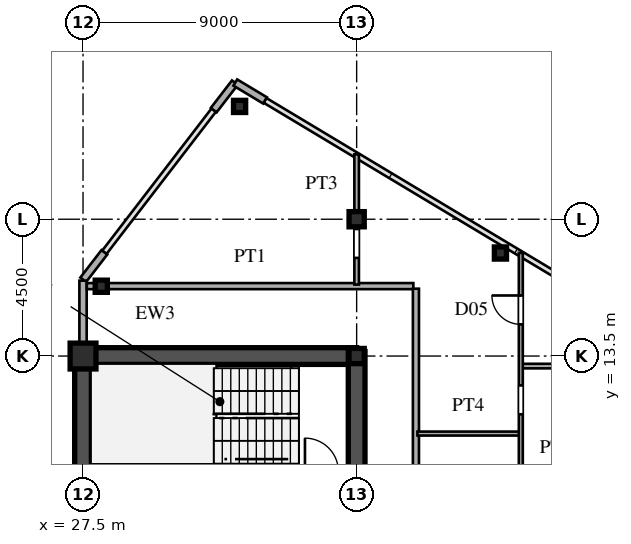
"""IFC4 building model, lengths in metres.
Left out: names, types, materials, properties, quantities, classifications, styles, units other than length and angle.
Written with IfcOpenShell. Run it as: python <this file> out.ifc"""

import sys

from ifc_helpers import new_model, si_unit, direction, frame, frame_2d, origin, origin_2d, place, context, subcontext, project, spatial, rectangle, hollow_rectangle, i_section, extrude, source, transform, mapped, element, fill, save


model = new_model("IFC4")
c1 = context("Model", 3, precision=1e-05, world=origin(), true_north=direction((0.0, 1.0)))
c2 = subcontext(c1, "Body", "Model", "MODEL_VIEW")
j1 = project(units=[si_unit("LENGTHUNIT", "METRE"), si_unit("PLANEANGLEUNIT", "RADIAN")], contexts=[c1])
p1 = place(None, origin())
s1 = spatial("IfcSite", under=j1, at=p1, CompositionType="ELEMENT")
p2 = place(p1, origin())
s2 = spatial("IfcBuilding", under=s1, at=p2, CompositionType="ELEMENT")
p3 = place(p2, frame((0.0, 0.0, 199.5)))
s3 = spatial("IfcBuildingStorey", under=s2, at=p3, CompositionType="ELEMENT", Elevation=199.5)
m1 = source(origin(), c2, "Body", "SweptSolid", [
    extrude(hollow_rectangle(XDim=0.85, YDim=0.85, WallThickness=0.036, at=origin_2d()), origin(), (0.0, 0.0, 1.0), 3.6),
])
p4 = place(p3, frame((27.5, 13.5, 0.0), z_axis=(0.0, 0.0, 1.0), x_axis=(1.0, 0.0, 0.0)))
e1 = element("IfcColumn", 1, at=p4, inside=s3, PredefinedType="COLUMN", context=c2, shape_type="MappedRepresentation", body=[
    mapped(m1, transform((0.0, 0.0, 0.0), scale=1.0)),
])
m2 = source(origin(), c2, "Body", "SweptSolid", [
    extrude(i_section(OverallWidth=0.5, OverallDepth=0.5, WebThickness=0.02, FlangeThickness=0.032, at=origin_2d()), origin(), (0.0, 0.0, 1.0), 3.6),
])
for number, where, z_axis, x_axis in (
    (2, (36.5, 13.5, 0.0), (0.0, 0.0, 1.0), (1.0, 0.0, 0.0)),
    (3, (36.5, 18.0, 0.0), (0.0, 0.0, 1.0), (1.0, 0.0, 0.0)),
):
    element("IfcColumn", number, at=place(p3, frame(where, z_axis=z_axis, x_axis=x_axis)), inside=s3, PredefinedType="COLUMN", context=c2, shape_type="MappedRepresentation", body=[
        mapped(m2, transform((0.0, 0.0, 0.0), scale=1.0)),
    ])
m3 = source(origin(), c2, "Body", "SweptSolid", [
    extrude(hollow_rectangle(XDim=0.4, YDim=0.4, WallThickness=0.016, at=origin_2d()), origin(), (0.0, 0.0, 1.0), 3.6),
])
for number, where, z_axis, x_axis in (
    (4, (32.65, 21.71, 0.0), (0.0, 0.0, 1.0), (1.0, 0.0, 0.0)),
    (5, (28.1, 15.796, 0.0), (0.0, 0.0, 1.0), (1.0, 0.0, 0.0)),
    (6, (41.23, 16.889, 0.0), (0.0, 0.0, 1.0), (1.0, 0.0, 0.0)),
):
    element("IfcColumn", number, at=place(p3, frame(where, z_axis=z_axis, x_axis=x_axis)), inside=s3, PredefinedType="COLUMN", context=c2, shape_type="MappedRepresentation", body=[
        mapped(m3, transform((0.0, 0.0, 0.0), scale=1.0)),
    ])
for number, where, z_axis, x_axis in (
    (7, (33.486, 21.908, 0.0), (0.0, 0.0, 1.0), (-0.857, 0.515, 0.0)),
    (8, (32.494, 22.492, 0.0), (0.0, 0.0, 1.0), (-0.61, -0.793, 0.0)),
    (9, (28.201, 16.912, 0.0), (0.0, 0.0, 1.0), (-0.61, -0.793, 0.0)),
):
    element("IfcWall", number, at=place(p3, frame(where, z_axis=z_axis, x_axis=x_axis)), inside=s3, PredefinedType="SOLIDWALL", context=c2, shape_type="SweptSolid", body=[
        extrude(rectangle(XDim=1.14, YDim=0.24, at=frame_2d((0.57, 0.0))), origin(), (0.0, 0.0, 1.0), 3.38),
    ])
p5 = place(p3, frame((27.5, 13.78, 0.0), z_axis=(0.0, 0.0, 1.0), x_axis=(0.0, 1.0, 0.0)))
e10 = element("IfcWall", 10, at=p5, inside=s3, PredefinedType="SOLIDWALL", context=c2, shape_type="SweptSolid", body=[
    extrude(rectangle(XDim=0.6, YDim=0.24, at=frame_2d((0.3, 0.0))), origin(), (0.0, 0.0, 1.0), 2.88),
])
p6 = place(p3, frame((27.5, 14.38, 0.0), z_axis=(0.0, 0.0, 1.0), x_axis=(0.0, 1.0, 0.0)))
e11 = element("IfcWall", 11, at=p6, inside=s3, PredefinedType="SOLIDWALL", context=c2, shape_type="SweptSolid", body=[
    extrude(rectangle(XDim=1.6, YDim=0.24, at=frame_2d((0.8, 0.0))), origin(), (0.0, 0.0, 1.0), 3.38),
])
p7 = place(p3, frame((27.5, 1.3, 0.0), z_axis=(0.0, 0.0, 1.0), x_axis=(0.0, 1.0, 0.0)))
e12 = element("IfcWall", 12, at=p7, inside=s3, PredefinedType="SHEAR", context=c2, shape_type="SweptSolid", body=[
    extrude(rectangle(XDim=12.2, YDim=0.55, at=frame_2d((6.1, 0.0))), origin(), (0.0, 0.0, 1.0), 3.38),
])
p8 = place(p3, frame((27.5, 13.5, 0.0), z_axis=(0.0, 0.0, 1.0), x_axis=(1.0, 0.0, 0.0)))
e13 = element("IfcWall", 13, at=p8, inside=s3, PredefinedType="SHEAR", context=c2, shape_type="SweptSolid", body=[
    extrude(rectangle(XDim=9.0, YDim=0.55, at=frame_2d((4.5, 0.0))), origin(), (0.0, 0.0, 1.0), 3.38),
])
p9 = place(p3, frame((36.5, 8.2, 0.0), z_axis=(0.0, 0.0, 1.0), x_axis=(0.0, 1.0, 0.0)))
e14 = element("IfcWall", 14, at=p9, inside=s3, PredefinedType="SHEAR", context=c2, shape_type="SweptSolid", body=[
    extrude(rectangle(XDim=5.45, YDim=0.55, at=frame_2d((2.725, 0.0))), origin(), (0.0, 0.0, 1.0), 3.38),
])
p10 = place(p9, frame((0.245, 0.0, 0.0)))
e15 = element("IfcOpeningElement", 15, at=p10, cuts=e14, PredefinedType="OPENING", context=c2, shape_type="SweptSolid", body=[
    extrude(rectangle(XDim=0.95, YDim=2.15, at=frame_2d((0.475, 1.075))), frame((0.0, 0.285, 0.0), z_axis=(0.0, -1.0, 0.0), x_axis=(1.0, 0.0, 0.0)), (0.0, 0.0, 1.0), 0.57),
])
p11 = place(p3, frame((38.5, 10.95, 0.0), z_axis=(0.0, 0.0, 1.0), x_axis=(1.0, 0.0, 0.0)))
e16 = element("IfcWall", 16, at=p11, inside=s3, PredefinedType="PARTITIONING", context=c2, shape_type="SweptSolid", body=[
    extrude(rectangle(XDim=3.35, YDim=0.13, at=frame_2d((1.675, 0.0))), origin(), (0.0, 0.0, 1.0), 3.38),
])
p12 = place(p3, frame((41.95, 13.17, 0.0), z_axis=(0.0, 0.0, 1.0), x_axis=(1.0, 0.0, 0.0)))
e17 = element("IfcWall", 17, at=p12, inside=s3, PredefinedType="PARTITIONING", context=c2, shape_type="SweptSolid", body=[
    extrude(rectangle(XDim=6.13, YDim=0.15, at=frame_2d((3.065, 0.0))), origin(), (0.0, 0.0, 1.0), 3.38),
])
p13 = place(p3, frame((27.625, 15.8, 0.0), z_axis=(0.0, 0.0, 1.0), x_axis=(1.0, 0.0, 0.0)))
e18 = element("IfcWall", 18, at=p13, inside=s3, PredefinedType="PARTITIONING", context=c2, shape_type="SweptSolid", body=[
    extrude(rectangle(XDim=10.74, YDim=0.2, at=frame_2d((5.37, 0.0))), origin(), (0.0, 0.0, 1.0), 3.38),
])
p14 = place(p3, frame((36.5, 15.85, 0.0), z_axis=(0.0, 0.0, 1.0), x_axis=(0.0, 1.0, 0.0)))
e19 = element("IfcWall", 19, at=p14, inside=s3, PredefinedType="PARTITIONING", context=c2, shape_type="SweptSolid", body=[
    extrude(rectangle(XDim=4.285, YDim=0.15, at=frame_2d((2.143, 0.0))), origin(), (0.0, 0.0, 1.0), 2.78),
])
p15 = place(p14, frame((0.878, 0.0, 0.0)))
e20 = element("IfcOpeningElement", 20, at=p15, cuts=e19, PredefinedType="OPENING", context=c2, shape_type="SweptSolid", body=[
    extrude(rectangle(XDim=0.95, YDim=2.15, at=frame_2d((0.475, 1.075))), frame((0.0, 0.085, 0.0), z_axis=(0.0, -1.0, 0.0), x_axis=(1.0, 0.0, 0.0)), (0.0, 0.0, 1.0), 0.17),
])
p16 = place(p3, frame((38.45, -15.715, 0.0), z_axis=(0.0, 0.0, 1.0), x_axis=(0.0, 1.0, 0.0)))
e21 = element("IfcWall", 21, at=p16, inside=s3, PredefinedType="PARTITIONING", context=c2, shape_type="SweptSolid", body=[
    extrude(rectangle(XDim=31.43, YDim=0.2, at=frame_2d((15.715, 0.0))), origin(), (0.0, 0.0, 1.0), 3.38),
])
p17 = place(p16, frame((3.39, 0.0, 0.0)))
e22 = element("IfcOpeningElement", 22, at=p17, cuts=e21, PredefinedType="OPENING", context=c2, shape_type="SweptSolid", body=[
    extrude(rectangle(XDim=1.05, YDim=2.25, at=frame_2d((0.525, 1.125))), frame((0.0, 0.11, 0.0), z_axis=(0.0, -1.0, 0.0), x_axis=(1.0, 0.0, 0.0)), (0.0, 0.0, 1.0), 0.22),
])
p18 = place(p16, frame((13.986, 0.0, 0.0)))
e23 = element("IfcOpeningElement", 23, at=p18, cuts=e21, PredefinedType="OPENING", context=c2, shape_type="SweptSolid", body=[
    extrude(rectangle(XDim=1.05, YDim=2.25, at=frame_2d((0.525, 1.125))), frame((0.0, 0.11, 0.0), z_axis=(0.0, -1.0, 0.0), x_axis=(1.0, 0.0, 0.0)), (0.0, 0.0, 1.0), 0.22),
])
p19 = place(p16, frame((22.387, 0.0, 0.0)))
e24 = element("IfcOpeningElement", 24, at=p19, cuts=e21, PredefinedType="OPENING", context=c2, shape_type="SweptSolid", body=[
    extrude(rectangle(XDim=1.05, YDim=2.25, at=frame_2d((0.525, 1.125))), frame((0.0, 0.11, 0.0), z_axis=(0.0, -1.0, 0.0), x_axis=(1.0, 0.0, 0.0)), (0.0, 0.0, 1.0), 0.22),
])
p20 = place(p3, frame((41.9, 1.772, 0.0), z_axis=(0.0, 0.0, 1.0), x_axis=(0.0, 1.0, 0.0)))
e25 = element("IfcWall", 25, at=p20, inside=s3, PredefinedType="PARTITIONING", context=c2, shape_type="SweptSolid", body=[
    extrude(rectangle(XDim=15.123, YDim=0.13, at=frame_2d((7.562, 0.0))), origin(), (0.0, 0.0, 1.0), 3.38),
])
p21 = place(p20, frame((4.95, 0.0, 0.0)))
e26 = element("IfcOpeningElement", 26, at=p21, cuts=e25, PredefinedType="OPENING", context=c2, shape_type="SweptSolid", body=[
    extrude(rectangle(XDim=0.95, YDim=2.15, at=frame_2d((0.475, 1.075))), frame((0.0, 0.075, 0.0), z_axis=(0.0, -1.0, 0.0), x_axis=(1.0, 0.0, 0.0)), (0.0, 0.0, 1.0), 0.15),
])
p22 = place(p20, frame((9.812, 0.0, 0.0)))
e27 = element("IfcOpeningElement", 27, at=p22, cuts=e25, PredefinedType="OPENING", context=c2, shape_type="SweptSolid", body=[
    extrude(rectangle(XDim=0.95, YDim=2.15, at=frame_2d((0.475, 1.075))), frame((0.0, 0.075, 0.0), z_axis=(0.0, -1.0, 0.0), x_axis=(1.0, 0.0, 0.0)), (0.0, 0.0, 1.0), 0.15),
])
p23 = place(p20, frame((12.77, 0.0, 0.0)))
e28 = element("IfcOpeningElement", 28, at=p23, cuts=e25, PredefinedType="OPENING", context=c2, shape_type="SweptSolid", body=[
    extrude(rectangle(XDim=0.95, YDim=2.15, at=frame_2d((0.475, 1.075))), frame((0.0, 0.075, 0.0), z_axis=(0.0, -1.0, 0.0), x_axis=(1.0, 0.0, 0.0)), (0.0, 0.0, 1.0), 0.15),
])
m4 = source(origin(), c2, "Body", "SweptSolid", [
    extrude(rectangle(XDim=0.95, YDim=2.15, at=frame_2d((0.475, 1.075))), frame((0.0, 0.025, 0.0), z_axis=(0.0, -1.0, 0.0), x_axis=(1.0, 0.0, 0.0)), (0.0, 0.0, 1.0), 0.05),
])
p24 = place(p23, origin())
e29 = element("IfcDoor", 29, at=p24, inside=s3, OperationType="SINGLE_SWING_RIGHT", PredefinedType="DOOR", context=c2, shape_type="MappedRepresentation", body=[
    mapped(m4, transform((0.0, 0.0, 0.0), scale=1.0)),
])
fill(e28, e29)
save(model, sys.argv[1])
